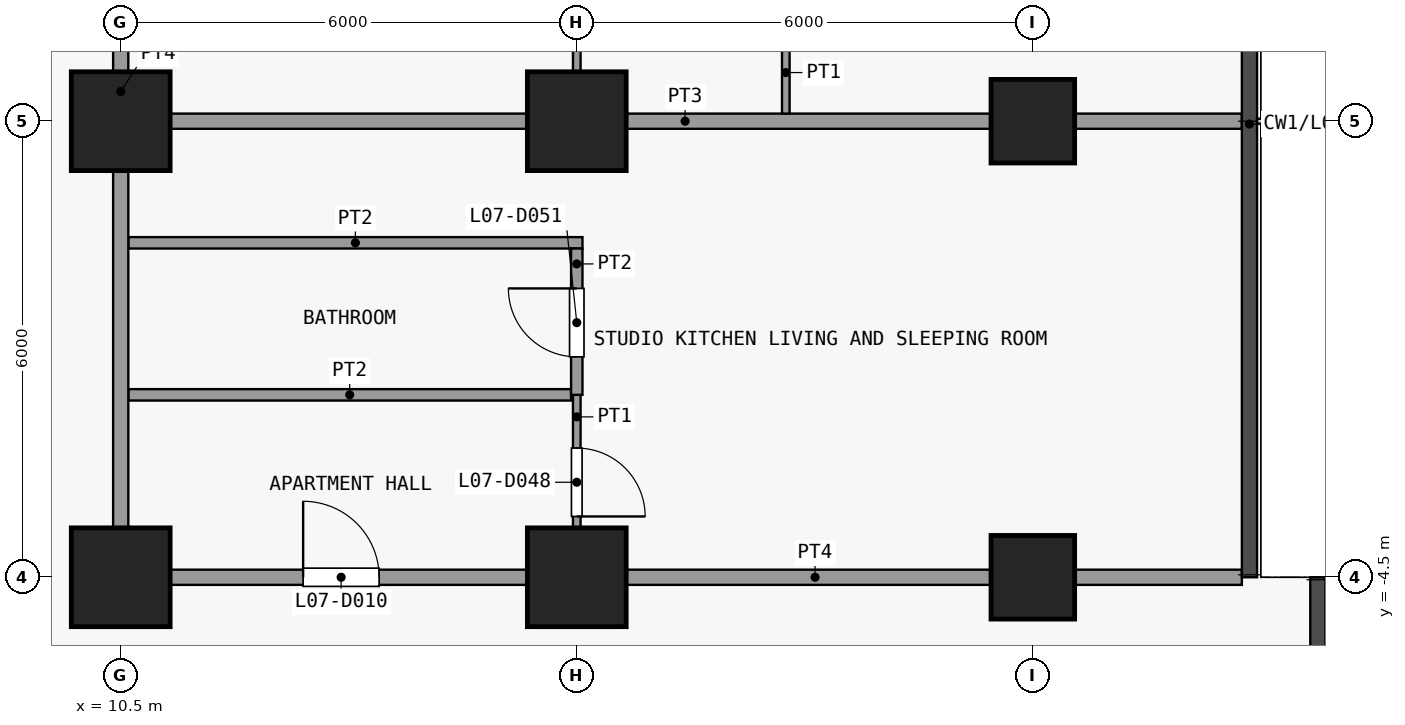
"""IFC4 building model, lengths in metres.
Left out: names, types, materials, properties, quantities, classifications, styles, units other than length and angle.
Written with IfcOpenShell. Run it as: python <this file> out.ifc"""

import sys

from ifc_helpers import new_model, si_unit, direction, frame, frame_2d, origin, origin_2d, place, context, subcontext, project, spatial, rectangle, extrude, element, fill, save


model = new_model("IFC4")
c1 = context("Model", 3, precision=1e-05, world=origin(), true_north=direction((0.0, 1.0)))
c2 = subcontext(c1, "Body", "Model", "MODEL_VIEW")
j1 = project(units=[si_unit("LENGTHUNIT", "METRE"), si_unit("PLANEANGLEUNIT", "RADIAN")], contexts=[c1])
p1 = place(None, origin())
s1 = spatial("IfcSite", under=j1, at=p1, CompositionType="ELEMENT")
p2 = place(p1, origin())
s2 = spatial("IfcBuilding", under=s1, at=p2, CompositionType="ELEMENT")
p3 = place(p2, frame((0.0, 0.0, 36.1)))
s3 = spatial("IfcBuildingStorey", under=s2, at=p3, CompositionType="ELEMENT", Elevation=36.1)
for number, where, z_axis, x_axis in (
    (1, (10.5, -4.5, 0.0), (0.0, 0.0, 1.0), (1.0, 0.0, 0.0)),
    (2, (10.5, 1.5, 0.0), (0.0, 0.0, 1.0), (1.0, 0.0, 0.0)),
    (3, (16.5, -4.5, 0.0), (0.0, 0.0, 1.0), (1.0, 0.0, 0.0)),
    (4, (16.5, 1.5, 0.0), (0.0, 0.0, 1.0), (1.0, 0.0, 0.0)),
):
    element("IfcColumn", number, at=place(p3, frame(where, z_axis=z_axis, x_axis=x_axis)), inside=s3, PredefinedType="COLUMN", context=c2, shape_type="SweptSolid", body=[
        extrude(rectangle(XDim=1.3, YDim=1.3, at=origin_2d()), origin(), (0.0, 0.0, 1.0), 3.6),
    ])
for number, where, z_axis, x_axis in (
    (5, (22.5, -4.5, 0.0), (0.0, 0.0, 1.0), (1.0, 0.0, 0.0)),
    (6, (22.5, 1.5, 0.0), (0.0, 0.0, 1.0), (1.0, 0.0, 0.0)),
):
    element("IfcColumn", number, at=place(p3, frame(where, z_axis=z_axis, x_axis=x_axis)), inside=s3, PredefinedType="COLUMN", context=c2, shape_type="SweptSolid", body=[
        extrude(rectangle(XDim=1.1, YDim=1.1, at=origin_2d()), origin(), (0.0, 0.0, 1.0), 3.6),
    ])
p4 = place(p3, frame((10.4, -4.5, 0.0), z_axis=(0.0, 0.0, 1.0), x_axis=(1.0, 0.0, 0.0)))
e7 = element("IfcWall", 7, at=p4, inside=s3, PredefinedType="PARTITIONING", context=c2, shape_type="SweptSolid", body=[
    extrude(rectangle(XDim=14.85, YDim=0.2, at=frame_2d((7.425, 0.0))), origin(), (0.0, 0.0, 1.0), 3.3),
])
p5 = place(p4, frame((2.5, 0.0, 0.0)))
e8 = element("IfcOpeningElement", 8, at=p5, cuts=e7, PredefinedType="OPENING", context=c2, shape_type="SweptSolid", body=[
    extrude(rectangle(XDim=1.0, YDim=2.1, at=frame_2d((0.5, 1.05))), frame((0.0, 0.11, 0.0), z_axis=(0.0, -1.0, 0.0), x_axis=(1.0, 0.0, 0.0)), (0.0, 0.0, 1.0), 0.22),
])
p6 = place(p3, frame((10.6, -2.1, 0.0), z_axis=(0.0, 0.0, 1.0), x_axis=(1.0, 0.0, 0.0)))
e9 = element("IfcWall", 9, at=p6, inside=s3, PredefinedType="PARTITIONING", context=c2, shape_type="SweptSolid", body=[
    extrude(rectangle(XDim=5.825, YDim=0.15, at=frame_2d((2.913, 0.0))), origin(), (0.0, 0.0, 1.0), 3.3),
])
p7 = place(p3, frame((10.6, -0.1, 0.0), z_axis=(0.0, 0.0, 1.0), x_axis=(1.0, 0.0, 0.0)))
e10 = element("IfcWall", 10, at=p7, inside=s3, PredefinedType="PARTITIONING", context=c2, shape_type="SweptSolid", body=[
    extrude(rectangle(XDim=5.975, YDim=0.15, at=frame_2d((2.987, 0.0))), origin(), (0.0, 0.0, 1.0), 3.3),
])
p8 = place(p3, frame((10.6, 1.5, 0.0), z_axis=(0.0, 0.0, 1.0), x_axis=(1.0, 0.0, 0.0)))
e11 = element("IfcWall", 11, at=p8, inside=s3, PredefinedType="PARTITIONING", context=c2, shape_type="SweptSolid", body=[
    extrude(rectangle(XDim=14.65, YDim=0.2, at=frame_2d((7.325, 0.0))), origin(), (0.0, 0.0, 1.0), 3.3),
])
p9 = place(p3, frame((10.5, -4.4, 0.0), z_axis=(0.0, 0.0, 1.0), x_axis=(0.0, 1.0, 0.0)))
e12 = element("IfcWall", 12, at=p9, inside=s3, PredefinedType="PARTITIONING", context=c2, shape_type="SweptSolid", body=[
    extrude(rectangle(XDim=17.8, YDim=0.2, at=frame_2d((8.9, 0.0))), origin(), (0.0, 0.0, 1.0), 3.3),
])
p10 = place(p9, frame((12.7, 0.0, 0.0)))
e13 = element("IfcOpeningElement", 13, at=p10, cuts=e12, PredefinedType="OPENING", context=c2, shape_type="SweptSolid", body=[
    extrude(rectangle(XDim=1.0, YDim=2.1, at=frame_2d((0.5, 1.05))), frame((0.0, 0.11, 0.0), z_axis=(0.0, -1.0, 0.0), x_axis=(1.0, 0.0, 0.0)), (0.0, 0.0, 1.0), 0.22),
])
p11 = place(p3, frame((16.5, -4.4, 0.0), z_axis=(0.0, 0.0, 1.0), x_axis=(0.0, 1.0, 0.0)))
e14 = element("IfcWall", 14, at=p11, inside=s3, PredefinedType="PARTITIONING", context=c2, shape_type="SweptSolid", body=[
    extrude(rectangle(XDim=2.3, YDim=0.1, at=frame_2d((1.15, 0.0))), origin(), (0.0, 0.0, 1.0), 3.3),
])
p12 = place(p11, frame((0.7, 0.0, 0.0)))
e15 = element("IfcOpeningElement", 15, at=p12, cuts=e14, PredefinedType="OPENING", context=c2, shape_type="SweptSolid", body=[
    extrude(rectangle(XDim=0.9, YDim=2.1, at=frame_2d((0.45, 1.05))), frame((0.0, 0.06, 0.0), z_axis=(0.0, -1.0, 0.0), x_axis=(1.0, 0.0, 0.0)), (0.0, 0.0, 1.0), 0.12),
])
p13 = place(p3, frame((16.5, 1.6, 0.0), z_axis=(0.0, 0.0, 1.0), x_axis=(0.0, 1.0, 0.0)))
e16 = element("IfcWall", 16, at=p13, inside=s3, PredefinedType="PARTITIONING", context=c2, shape_type="SweptSolid", body=[
    extrude(rectangle(XDim=2.9, YDim=0.1, at=frame_2d((1.45, 0.0))), origin(), (0.0, 0.0, 1.0), 3.3),
])
p14 = place(p3, frame((16.5, -2.1, 0.0), z_axis=(0.0, 0.0, 1.0), x_axis=(0.0, 1.0, 0.0)))
e17 = element("IfcWall", 17, at=p14, inside=s3, PredefinedType="PARTITIONING", context=c2, shape_type="SweptSolid", body=[
    extrude(rectangle(XDim=1.925, YDim=0.15, at=frame_2d((0.962, 0.0))), origin(), (0.0, 0.0, 1.0), 3.3),
])
p15 = place(p14, frame((0.5, 0.0, 0.0)))
e18 = element("IfcOpeningElement", 18, at=p15, cuts=e17, PredefinedType="OPENING", context=c2, shape_type="SweptSolid", body=[
    extrude(rectangle(XDim=0.9, YDim=2.1, at=frame_2d((0.45, 1.05))), frame((0.0, 0.085, 0.0), z_axis=(0.0, -1.0, 0.0), x_axis=(1.0, 0.0, 0.0)), (0.0, 0.0, 1.0), 0.17),
])
p16 = place(p3, frame((19.25, 1.6, 0.0), z_axis=(0.0, 0.0, 1.0), x_axis=(0.0, 1.0, 0.0)))
e19 = element("IfcWall", 19, at=p16, inside=s3, PredefinedType="PARTITIONING", context=c2, shape_type="SweptSolid", body=[
    extrude(rectangle(XDim=3.2, YDim=0.1, at=frame_2d((1.6, 0.0))), origin(), (0.0, 0.0, 1.0), 3.3),
])
p17 = place(p16, frame((1.2, 0.0, 0.0)))
e20 = element("IfcOpeningElement", 20, at=p17, cuts=e19, PredefinedType="OPENING", context=c2, shape_type="SweptSolid", body=[
    extrude(rectangle(XDim=0.9, YDim=2.1, at=frame_2d((0.45, 1.05))), frame((0.0, 0.06, 0.0), z_axis=(0.0, -1.0, 0.0), x_axis=(1.0, 0.0, 0.0)), (0.0, 0.0, 1.0), 0.12),
])
p18 = place(p5, origin())
e21 = element("IfcDoor", 21, at=p18, inside=s3, OperationType="SINGLE_SWING_RIGHT", PredefinedType="DOOR", context=c2, shape_type="SweptSolid", body=[
    extrude(rectangle(XDim=1.0, YDim=2.1, at=frame_2d((0.5, 1.05))), frame((0.0, 0.025, 0.0), z_axis=(0.0, -1.0, 0.0), x_axis=(1.0, 0.0, 0.0)), (0.0, 0.0, 1.0), 0.05),
])
fill(e8, e21)
p19 = place(p12, origin())
e22 = element("IfcDoor", 22, at=p19, inside=s3, OperationType="SINGLE_SWING_LEFT", PredefinedType="DOOR", context=c2, shape_type="SweptSolid", body=[
    extrude(rectangle(XDim=0.9, YDim=2.1, at=frame_2d((0.45, 1.05))), frame((0.0, 0.025, 0.0), z_axis=(0.0, -1.0, 0.0), x_axis=(1.0, 0.0, 0.0)), (0.0, 0.0, 1.0), 0.05),
])
fill(e15, e22)
p20 = place(p15, origin())
e23 = element("IfcDoor", 23, at=p20, inside=s3, OperationType="SINGLE_SWING_LEFT", PredefinedType="DOOR", context=c2, shape_type="SweptSolid", body=[
    extrude(rectangle(XDim=0.9, YDim=2.1, at=frame_2d((0.45, 1.05))), frame((0.0, 0.025, 0.0), z_axis=(0.0, -1.0, 0.0), x_axis=(1.0, 0.0, 0.0)), (0.0, 0.0, 1.0), 0.05),
])
fill(e18, e23)
save(model, sys.argv[1])
